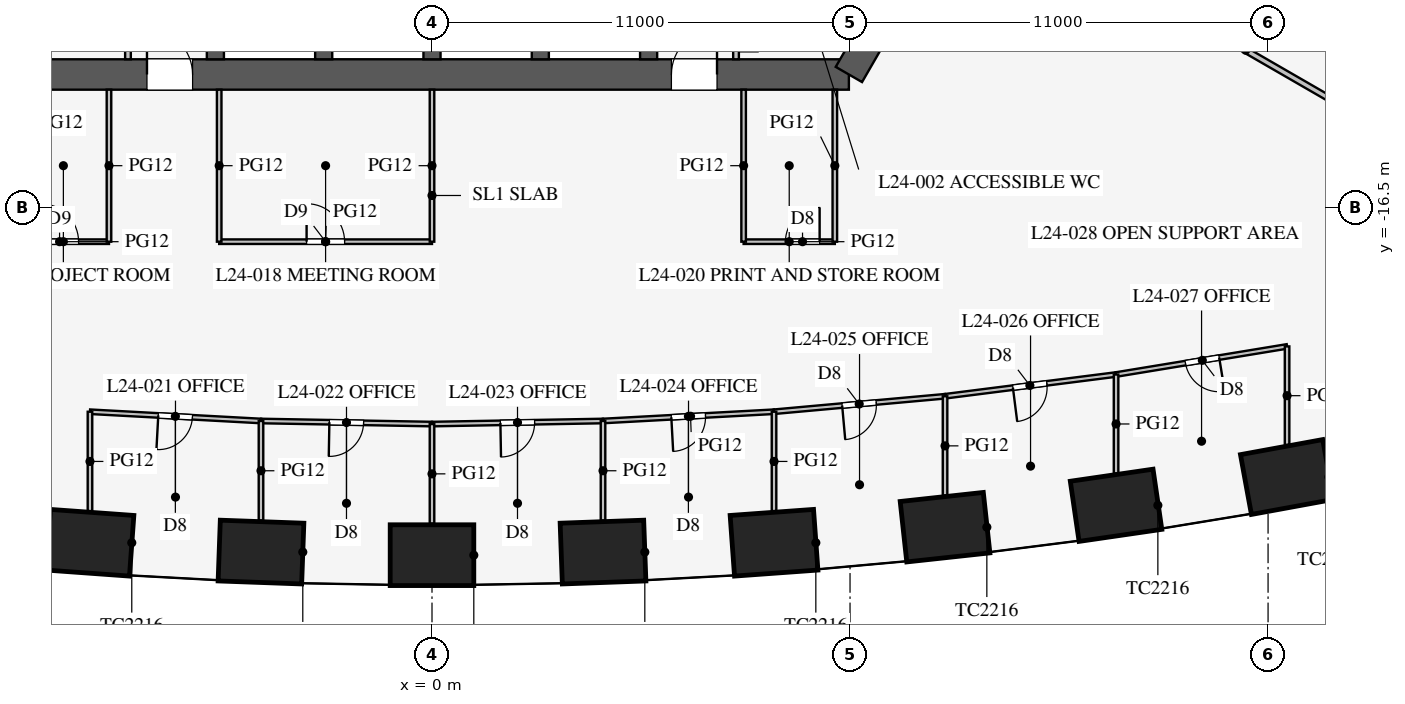
"""IFC4 building model, lengths in metres.
Left out: names, types, materials, properties, quantities, classifications, styles, units other than length and angle.
Written with IfcOpenShell. Run it as: python <this file> out.ifc"""

import sys

from ifc_helpers import new_model, si_unit, direction, frame, frame_2d, origin, origin_2d, place, context, subcontext, project, spatial, rectangle, extrude, element, fill, save


model = new_model("IFC4")
c1 = context("Model", 3, precision=1e-05, world=origin(), true_north=direction((0.0, 1.0)))
c2 = subcontext(c1, "Body", "Model", "MODEL_VIEW")
j1 = project(units=[si_unit("LENGTHUNIT", "METRE"), si_unit("PLANEANGLEUNIT", "RADIAN")], contexts=[c1])
p1 = place(None, origin())
s1 = spatial("IfcSite", under=j1, at=p1, CompositionType="ELEMENT")
p2 = place(p1, origin())
s2 = spatial("IfcBuilding", under=s1, at=p2, CompositionType="ELEMENT")
p3 = place(p2, frame((0.0, 0.0, 107.3)))
s3 = spatial("IfcBuildingStorey", under=s2, at=p3, CompositionType="ELEMENT", Elevation=107.3)
for number, where, z_axis, x_axis in (
    (1, (-9.0, -25.323, 0.0), (0.0, 0.0, 1.0), (0.997, -0.072, 0.0)),
    (2, (-4.5, -25.568, 0.0), (0.0, 0.0, 1.0), (0.999, -0.036, 0.0)),
    (3, (0.0, -25.65, 0.0), (0.0, 0.0, 1.0), (1.0, 0.0, 0.0)),
    (4, (4.5, -25.568, 0.0), (0.0, 0.0, 1.0), (0.999, 0.036, 0.0)),
    (5, (9.0, -25.323, 0.0), (0.0, 0.0, 1.0), (0.997, 0.072, 0.0)),
    (6, (13.5, -24.913, 0.0), (0.0, 0.0, 1.0), (0.994, 0.108, 0.0)),
    (7, (18.0, -24.337, 0.0), (0.0, 0.0, 1.0), (0.99, 0.144, 0.0)),
    (8, (22.5, -23.593, 0.0), (0.0, 0.0, 1.0), (0.984, 0.18, 0.0)),
):
    element("IfcColumn", number, at=place(p3, frame(where, z_axis=z_axis, x_axis=x_axis)), inside=s3, PredefinedType="COLUMN", context=c2, shape_type="SweptSolid", body=[
        extrude(rectangle(XDim=2.2, YDim=1.6, at=origin_2d()), origin(), (0.0, 0.0, 1.0), 4.2),
    ])
p4 = place(p3, frame((-10.97, -13.0, 0.0), z_axis=(0.0, 0.0, 1.0), x_axis=(1.0, 0.0, 0.0)))
e9 = element("IfcWall", 9, at=p4, inside=s3, PredefinedType="SHEAR", context=c2, shape_type="SweptSolid", body=[
    extrude(rectangle(XDim=21.939, YDim=0.8, at=frame_2d((10.97, 0.0))), origin(), (0.0, 0.0, 1.0), 4.2),
])
p5 = place(p4, frame((17.27, 0.0, 0.0)))
e10 = element("IfcOpeningElement", 10, at=p5, cuts=e9, PredefinedType="OPENING", context=c2, shape_type="SweptSolid", body=[
    extrude(rectangle(XDim=1.2, YDim=2.1, at=frame_2d((0.6, 1.05))), frame((0.0, 0.41, 0.0), z_axis=(0.0, -1.0, 0.0), x_axis=(1.0, 0.0, 0.0)), (0.0, 0.0, 1.0), 0.82),
])
p6 = place(p4, frame((3.47, 0.0, 0.0)))
e11 = element("IfcOpeningElement", 11, at=p6, cuts=e9, PredefinedType="OPENING", context=c2, shape_type="SweptSolid", body=[
    extrude(rectangle(XDim=1.2, YDim=2.1, at=frame_2d((0.6, 1.05))), frame((0.0, 0.41, 0.0), z_axis=(0.0, -1.0, 0.0), x_axis=(1.0, 0.0, 0.0)), (0.0, 0.0, 1.0), 0.82),
])
p7 = place(p3, frame((10.97, -13.0, 0.0), z_axis=(0.0, 0.0, 1.0), x_axis=(0.499995765644, 0.866027848477, 0.0)))
e12 = element("IfcWall", 12, at=p7, inside=s3, PredefinedType="SHEAR", context=c2, shape_type="SweptSolid", body=[
    extrude(rectangle(XDim=11.547, YDim=0.8, at=frame_2d((5.773, 0.0))), origin(), (0.0, 0.0, 1.0), 4.2),
])
for number, where, z_axis, x_axis in (
    (13, (-5.7, -10.025, 0.0), (0.0, 0.0, 1.0), (0.0, -1.0, 0.0)),
    (14, (-2.85, -10.025, 0.0), (0.0, 0.0, 1.0), (0.0, -1.0, 0.0)),
    (15, (0.0, -10.025, 0.0), (0.0, 0.0, 1.0), (0.0, -1.0, 0.0)),
    (16, (2.85, -10.025, 0.0), (0.0, 0.0, 1.0), (0.0, -1.0, 0.0)),
    (17, (5.7, -10.025, 0.0), (0.0, 0.0, 1.0), (0.0, -1.0, 0.0)),
):
    element("IfcWall", number, at=place(p3, frame(where, z_axis=z_axis, x_axis=x_axis)), inside=s3, PredefinedType="SHEAR", context=c2, shape_type="SweptSolid", body=[
        extrude(rectangle(XDim=2.575, YDim=0.45, at=frame_2d((1.288, 0.0))), origin(), (0.0, 0.0, 1.0), 4.2),
    ])
p8 = place(p3, frame((8.0, -7.5, 0.0), z_axis=(0.0, 0.0, 1.0), x_axis=(0.0, -1.0, 0.0)))
e18 = element("IfcWall", 18, at=p8, inside=s3, PredefinedType="PARTITIONING", context=c2, shape_type="SweptSolid", body=[
    extrude(rectangle(XDim=5.1, YDim=0.15, at=frame_2d((2.55, 0.0))), origin(), (0.0, 0.0, 1.0), 4.0),
])
p9 = place(p8, frame((2.6, 0.0, 0.0)))
e19 = element("IfcOpeningElement", 19, at=p9, cuts=e18, PredefinedType="OPENING", context=c2, shape_type="SweptSolid", body=[
    extrude(rectangle(XDim=0.9, YDim=2.1, at=frame_2d((0.45, 1.05))), frame((0.0, 0.085, 0.0), z_axis=(0.0, -1.0, 0.0), x_axis=(1.0, 0.0, 0.0)), (0.0, 0.0, 1.0), 0.17),
])
p10 = place(p3, frame((-8.0, -7.5, 0.0), z_axis=(0.0, 0.0, 1.0), x_axis=(0.0, -1.0, 0.0)))
e20 = element("IfcWall", 20, at=p10, inside=s3, PredefinedType="PARTITIONING", context=c2, shape_type="SweptSolid", body=[
    extrude(rectangle(XDim=5.1, YDim=0.15, at=frame_2d((2.55, 0.0))), origin(), (0.0, 0.0, 1.0), 4.0),
])
p11 = place(p10, frame((2.6, 0.0, 0.0)))
e21 = element("IfcOpeningElement", 21, at=p11, cuts=e20, PredefinedType="OPENING", context=c2, shape_type="SweptSolid", body=[
    extrude(rectangle(XDim=0.9, YDim=2.1, at=frame_2d((0.45, 1.05))), frame((0.0, 0.085, 0.0), z_axis=(0.0, -1.0, 0.0), x_axis=(1.0, 0.0, 0.0)), (0.0, 0.0, 1.0), 0.17),
])
p12 = place(p3, frame((14.203, -8.2, 0.0), z_axis=(0.0, 0.0, 1.0), x_axis=(0.866024668836, -0.500001272966, 0.0)))
e22 = element("IfcWall", 22, at=p12, inside=s3, PredefinedType="PARTITIONING", context=c2, shape_type="SweptSolid", body=[
    extrude(rectangle(XDim=16.65, YDim=0.15, at=frame_2d((8.325, 0.0))), origin(), (0.0, 0.0, 1.0), 2.3),
])
p13 = place(p3, frame((8.2, -17.4, 0.0), z_axis=(0.0, 0.0, 1.0), x_axis=(1.0, 0.0, 0.0)))
e23 = element("IfcWall", 23, at=p13, inside=s3, PredefinedType="PARTITIONING", context=c2, shape_type="SweptSolid", body=[
    extrude(rectangle(XDim=2.4, YDim=0.12, at=frame_2d((1.2, 0.0))), origin(), (0.0, 0.0, 1.0), 2.9),
])
p14 = place(p13, frame((1.1, 0.0, 0.15)))
e24 = element("IfcOpeningElement", 24, at=p14, cuts=e23, PredefinedType="OPENING", context=c2, shape_type="SweptSolid", body=[
    extrude(rectangle(XDim=0.9, YDim=2.1, at=frame_2d((0.45, 1.05))), frame((0.0, 0.07, 0.0), z_axis=(0.0, -1.0, 0.0), x_axis=(1.0, 0.0, 0.0)), (0.0, 0.0, 1.0), 0.14),
])
p15 = place(p3, frame((-10.9, -17.4, 0.0), z_axis=(0.0, 0.0, 1.0), x_axis=(1.0, 0.0, 0.0)))
e25 = element("IfcWall", 25, at=p15, inside=s3, PredefinedType="PARTITIONING", context=c2, shape_type="SweptSolid", body=[
    extrude(rectangle(XDim=2.4, YDim=0.12, at=frame_2d((1.2, 0.0))), origin(), (0.0, 0.0, 1.0), 2.9),
])
p16 = place(p15, frame((0.6, 0.0, 0.15)))
e26 = element("IfcOpeningElement", 26, at=p16, cuts=e25, PredefinedType="OPENING", context=c2, shape_type="SweptSolid", body=[
    extrude(rectangle(XDim=1.0, YDim=2.1, at=frame_2d((0.5, 1.05))), frame((0.0, 0.07, 0.0), z_axis=(0.0, -1.0, 0.0), x_axis=(1.0, 0.0, 0.0)), (0.0, 0.0, 1.0), 0.14),
])
p17 = place(p3, frame((-5.6, -17.4, 0.0), z_axis=(0.0, 0.0, 1.0), x_axis=(1.0, 0.0, 0.0)))
e27 = element("IfcWall", 27, at=p17, inside=s3, PredefinedType="PARTITIONING", context=c2, shape_type="SweptSolid", body=[
    extrude(rectangle(XDim=5.6, YDim=0.12, at=frame_2d((2.8, 0.0))), origin(), (0.0, 0.0, 1.0), 2.9),
])
p18 = place(p17, frame((2.3, 0.0, 0.15)))
e28 = element("IfcOpeningElement", 28, at=p18, cuts=e27, PredefinedType="OPENING", context=c2, shape_type="SweptSolid", body=[
    extrude(rectangle(XDim=1.0, YDim=2.1, at=frame_2d((0.5, 1.05))), frame((0.0, 0.07, 0.0), z_axis=(0.0, -1.0, 0.0), x_axis=(1.0, 0.0, 0.0)), (0.0, 0.0, 1.0), 0.14),
])
for number, where, z_axis, x_axis in (
    (29, (10.6, -13.4, 0.0), (0.0, 0.0, 1.0), (0.0, -1.0, 0.0)),
    (30, (8.2, -13.4, 0.0), (0.0, 0.0, 1.0), (0.0, -1.0, 0.0)),
):
    element("IfcWall", number, at=place(p3, frame(where, z_axis=z_axis, x_axis=x_axis)), inside=s3, PredefinedType="PARTITIONING", context=c2, shape_type="SweptSolid", body=[
        extrude(rectangle(XDim=4.0, YDim=0.12, at=frame_2d((2.0, 0.0))), origin(), (0.0, 0.0, 1.0), 2.9),
    ])
p19 = place(p3, frame((0.0, -13.4, 0.0), z_axis=(0.0, 0.0, 1.0), x_axis=(0.0, -1.0, 0.0)))
e31 = element("IfcWall", 31, at=p19, inside=s3, PredefinedType="PARTITIONING", context=c2, shape_type="SweptSolid", body=[
    extrude(rectangle(XDim=4.0, YDim=0.12, at=frame_2d((2.0, 0.0))), origin(), (0.0, 0.0, 1.0), 2.8),
])
for number, where, z_axis, x_axis in (
    (32, (-5.6, -13.4, 0.0), (0.0, 0.0, 1.0), (0.0, -1.0, 0.0)),
    (33, (-8.5, -13.4, 0.0), (0.0, 0.0, 1.0), (0.0, -1.0, 0.0)),
):
    element("IfcWall", number, at=place(p3, frame(where, z_axis=z_axis, x_axis=x_axis)), inside=s3, PredefinedType="PARTITIONING", context=c2, shape_type="SweptSolid", body=[
        extrude(rectangle(XDim=4.0, YDim=0.12, at=frame_2d((2.0, 0.0))), origin(), (0.0, 0.0, 1.0), 2.9),
    ])
p20 = place(p3, frame((0.0, -22.2, 0.0), z_axis=(0.0, 0.0, 1.0), x_axis=(0.999837820638, 0.018009231578, 0.0)))
e34 = element("IfcWall", 34, at=p20, inside=s3, PredefinedType="PARTITIONING", context=c2, shape_type="SweptSolid", body=[
    extrude(rectangle(XDim=4.501, YDim=0.12, at=frame_2d((2.25, 0.0))), origin(), (0.0, 0.0, 1.0), 2.9),
])
p21 = place(p20, frame((1.8, 0.0, 0.15)))
e35 = element("IfcOpeningElement", 35, at=p21, cuts=e34, PredefinedType="OPENING", context=c2, shape_type="SweptSolid", body=[
    extrude(rectangle(XDim=0.9, YDim=2.1, at=frame_2d((0.45, 1.05))), frame((0.0, 0.07, 0.0), z_axis=(0.0, -1.0, 0.0), x_axis=(1.0, 0.0, 0.0)), (0.0, 0.0, 1.0), 0.14),
])
p22 = place(p3, frame((13.5, -21.468, 0.0), z_axis=(0.0, 0.0, 1.0), x_axis=(0.992010652594, 0.12615413247, 0.0)))
e36 = element("IfcWall", 36, at=p22, inside=s3, PredefinedType="PARTITIONING", context=c2, shape_type="SweptSolid", body=[
    extrude(rectangle(XDim=4.536, YDim=0.12, at=frame_2d((2.268, 0.0))), origin(), (0.0, 0.0, 1.0), 2.9),
])
p23 = place(p22, frame((1.8, 0.0, 0.15)))
e37 = element("IfcOpeningElement", 37, at=p23, cuts=e36, PredefinedType="OPENING", context=c2, shape_type="SweptSolid", body=[
    extrude(rectangle(XDim=0.9, YDim=2.1, at=frame_2d((0.45, 1.05))), frame((0.0, 0.07, 0.0), z_axis=(0.0, -1.0, 0.0), x_axis=(1.0, 0.0, 0.0)), (0.0, 0.0, 1.0), 0.14),
])
p24 = place(p3, frame((18.0, -20.896, 0.0), z_axis=(0.0, 0.0, 1.0), x_axis=(0.986764681833, 0.162158757664, 0.0)))
e38 = element("IfcWall", 38, at=p24, inside=s3, PredefinedType="PARTITIONING", context=c2, shape_type="SweptSolid", body=[
    extrude(rectangle(XDim=4.56, YDim=0.12, at=frame_2d((2.28, 0.0))), origin(), (0.0, 0.0, 1.0), 2.9),
])
p25 = place(p24, frame((1.85, 0.0, 0.15)))
e39 = element("IfcOpeningElement", 39, at=p25, cuts=e38, PredefinedType="OPENING", context=c2, shape_type="SweptSolid", body=[
    extrude(rectangle(XDim=0.9, YDim=2.1, at=frame_2d((0.45, 1.05))), frame((0.0, 0.07, 0.0), z_axis=(0.0, -1.0, 0.0), x_axis=(1.0, 0.0, 0.0)), (0.0, 0.0, 1.0), 0.14),
])
p26 = place(p3, frame((4.5, -22.119, 0.0), z_axis=(0.0, 0.0, 1.0), x_axis=(0.998537376538, 0.054065771581, 0.0)))
e40 = element("IfcWall", 40, at=p26, inside=s3, PredefinedType="PARTITIONING", context=c2, shape_type="SweptSolid", body=[
    extrude(rectangle(XDim=4.507, YDim=0.12, at=frame_2d((2.253, 0.0))), origin(), (0.0, 0.0, 1.0), 2.9),
])
p27 = place(p26, frame((1.8, 0.0, 0.15)))
e41 = element("IfcOpeningElement", 41, at=p27, cuts=e40, PredefinedType="OPENING", context=c2, shape_type="SweptSolid", body=[
    extrude(rectangle(XDim=0.9, YDim=2.1, at=frame_2d((0.45, 1.05))), frame((0.0, 0.07, 0.0), z_axis=(0.0, -1.0, 0.0), x_axis=(1.0, 0.0, 0.0)), (0.0, 0.0, 1.0), 0.14),
])
p28 = place(p3, frame((9.0, -21.875, 0.0), z_axis=(0.0, 0.0, 1.0), x_axis=(0.995930325215, 0.090126507295, 0.0)))
e42 = element("IfcWall", 42, at=p28, inside=s3, PredefinedType="PARTITIONING", context=c2, shape_type="SweptSolid", body=[
    extrude(rectangle(XDim=4.518, YDim=0.12, at=frame_2d((2.259, 0.0))), origin(), (0.0, 0.0, 1.0), 2.9),
])
p29 = place(p28, frame((1.8, 0.0, 0.15)))
e43 = element("IfcOpeningElement", 43, at=p29, cuts=e42, PredefinedType="OPENING", context=c2, shape_type="SweptSolid", body=[
    extrude(rectangle(XDim=0.9, YDim=2.1, at=frame_2d((0.45, 1.05))), frame((0.0, 0.07, 0.0), z_axis=(0.0, -1.0, 0.0), x_axis=(1.0, 0.0, 0.0)), (0.0, 0.0, 1.0), 0.14),
])
p30 = place(p3, frame((-4.5, -22.119, 0.0), z_axis=(0.0, 0.0, 1.0), x_axis=(0.999837820638, -0.018009231578, 0.0)))
e44 = element("IfcWall", 44, at=p30, inside=s3, PredefinedType="PARTITIONING", context=c2, shape_type="SweptSolid", body=[
    extrude(rectangle(XDim=4.501, YDim=0.12, at=frame_2d((2.25, 0.0))), origin(), (0.0, 0.0, 1.0), 2.9),
])
p31 = place(p30, frame((1.8, 0.0, 0.15)))
e45 = element("IfcOpeningElement", 45, at=p31, cuts=e44, PredefinedType="OPENING", context=c2, shape_type="SweptSolid", body=[
    extrude(rectangle(XDim=0.9, YDim=2.1, at=frame_2d((0.45, 1.05))), frame((0.0, 0.07, 0.0), z_axis=(0.0, -1.0, 0.0), x_axis=(1.0, 0.0, 0.0)), (0.0, 0.0, 1.0), 0.14),
])
p32 = place(p3, frame((-9.0, -21.875, 0.0), z_axis=(0.0, 0.0, 1.0), x_axis=(0.998537376538, -0.054065771581, 0.0)))
e46 = element("IfcWall", 46, at=p32, inside=s3, PredefinedType="PARTITIONING", context=c2, shape_type="SweptSolid", body=[
    extrude(rectangle(XDim=4.507, YDim=0.12, at=frame_2d((2.253, 0.0))), origin(), (0.0, 0.0, 1.0), 2.9),
])
p33 = place(p32, frame((1.8, 0.0, 0.15)))
e47 = element("IfcOpeningElement", 47, at=p33, cuts=e46, PredefinedType="OPENING", context=c2, shape_type="SweptSolid", body=[
    extrude(rectangle(XDim=0.9, YDim=2.1, at=frame_2d((0.45, 1.05))), frame((0.0, 0.07, 0.0), z_axis=(0.0, -1.0, 0.0), x_axis=(1.0, 0.0, 0.0)), (0.0, 0.0, 1.0), 0.14),
])
p34 = place(p3, frame((0.0, -22.2, 0.0), z_axis=(0.0, 0.0, 1.0), x_axis=(0.0, -1.0, 0.0)))
e48 = element("IfcWall", 48, at=p34, inside=s3, PredefinedType="PARTITIONING", context=c2, shape_type="SweptSolid", body=[
    extrude(rectangle(XDim=2.62, YDim=0.12, at=frame_2d((1.31, 0.0))), origin(), (0.0, 0.0, 1.0), 2.8),
])
p35 = place(p3, frame((13.5, -21.468, 0.0), z_axis=(0.0, 0.0, 1.0), x_axis=(0.0, -1.0, 0.0)))
e49 = element("IfcWall", 49, at=p35, inside=s3, PredefinedType="PARTITIONING", context=c2, shape_type="SweptSolid", body=[
    extrude(rectangle(XDim=2.61, YDim=0.12, at=frame_2d((1.305, 0.0))), origin(), (0.0, 0.0, 1.0), 2.6),
])
p36 = place(p3, frame((18.0, -20.896, 0.0), z_axis=(0.0, 0.0, 1.0), x_axis=(0.0, -1.0, 0.0)))
e50 = element("IfcWall", 50, at=p36, inside=s3, PredefinedType="PARTITIONING", context=c2, shape_type="SweptSolid", body=[
    extrude(rectangle(XDim=2.603, YDim=0.12, at=frame_2d((1.302, 0.0))), origin(), (0.0, 0.0, 1.0), 2.8),
])
p37 = place(p3, frame((22.5, -20.156, 0.0), z_axis=(0.0, 0.0, 1.0), x_axis=(0.0, -1.0, 0.0)))
e51 = element("IfcWall", 51, at=p37, inside=s3, PredefinedType="PARTITIONING", context=c2, shape_type="SweptSolid", body=[
    extrude(rectangle(XDim=2.593, YDim=0.12, at=frame_2d((1.296, 0.0))), origin(), (0.0, 0.0, 1.0), 2.9),
])
p38 = place(p3, frame((4.5, -22.119, 0.0), z_axis=(0.0, 0.0, 1.0), x_axis=(0.0, -1.0, 0.0)))
e52 = element("IfcWall", 52, at=p38, inside=s3, PredefinedType="PARTITIONING", context=c2, shape_type="SweptSolid", body=[
    extrude(rectangle(XDim=2.619, YDim=0.12, at=frame_2d((1.31, 0.0))), origin(), (0.0, 0.0, 1.0), 2.8),
])
p39 = place(p3, frame((9.0, -21.875, 0.0), z_axis=(0.0, 0.0, 1.0), x_axis=(0.0, -1.0, 0.0)))
e53 = element("IfcWall", 53, at=p39, inside=s3, PredefinedType="PARTITIONING", context=c2, shape_type="SweptSolid", body=[
    extrude(rectangle(XDim=2.616, YDim=0.12, at=frame_2d((1.308, 0.0))), origin(), (0.0, 0.0, 1.0), 2.9),
])
p40 = place(p3, frame((-4.5, -22.119, 0.0), z_axis=(0.0, 0.0, 1.0), x_axis=(0.0, -1.0, 0.0)))
e54 = element("IfcWall", 54, at=p40, inside=s3, PredefinedType="PARTITIONING", context=c2, shape_type="SweptSolid", body=[
    extrude(rectangle(XDim=2.619, YDim=0.12, at=frame_2d((1.31, 0.0))), origin(), (0.0, 0.0, 1.0), 2.8),
])
p41 = place(p3, frame((-9.0, -21.875, 0.0), z_axis=(0.0, 0.0, 1.0), x_axis=(0.0, -1.0, 0.0)))
e55 = element("IfcWall", 55, at=p41, inside=s3, PredefinedType="PARTITIONING", context=c2, shape_type="SweptSolid", body=[
    extrude(rectangle(XDim=2.616, YDim=0.12, at=frame_2d((1.308, 0.0))), origin(), (0.0, 0.0, 1.0), 2.9),
])
p42 = place(p5, origin())
e56 = element("IfcDoor", 56, at=p42, inside=s3, OperationType="SINGLE_SWING_RIGHT", PredefinedType="DOOR", context=c2, shape_type="SweptSolid", body=[
    extrude(rectangle(XDim=1.2, YDim=2.1, at=frame_2d((0.6, 1.05))), frame((0.0, 0.025, 0.0), z_axis=(0.0, -1.0, 0.0), x_axis=(1.0, 0.0, 0.0)), (0.0, 0.0, 1.0), 0.05),
])
fill(e10, e56)
p43 = place(p6, origin())
e57 = element("IfcDoor", 57, at=p43, inside=s3, OperationType="SINGLE_SWING_LEFT", PredefinedType="DOOR", context=c2, shape_type="SweptSolid", body=[
    extrude(rectangle(XDim=1.2, YDim=2.1, at=frame_2d((0.6, 1.05))), frame((0.0, 0.025, 0.0), z_axis=(0.0, -1.0, 0.0), x_axis=(1.0, 0.0, 0.0)), (0.0, 0.0, 1.0), 0.05),
])
fill(e11, e57)
p44 = place(p18, origin())
e58 = element("IfcDoor", 58, at=p44, inside=s3, OperationType="SINGLE_SWING_LEFT", PredefinedType="DOOR", context=c2, shape_type="SweptSolid", body=[
    extrude(rectangle(XDim=1.0, YDim=2.1, at=frame_2d((0.5, 1.05))), frame((0.0, 0.025, 0.0), z_axis=(0.0, -1.0, 0.0), x_axis=(1.0, 0.0, 0.0)), (0.0, 0.0, 1.0), 0.05),
])
fill(e28, e58)
p45 = place(p16, origin())
e59 = element("IfcDoor", 59, at=p45, inside=s3, OperationType="SINGLE_SWING_LEFT", PredefinedType="DOOR", context=c2, shape_type="SweptSolid", body=[
    extrude(rectangle(XDim=1.0, YDim=2.1, at=frame_2d((0.5, 1.05))), frame((0.0, 0.025, 0.0), z_axis=(0.0, -1.0, 0.0), x_axis=(1.0, 0.0, 0.0)), (0.0, 0.0, 1.0), 0.05),
])
fill(e26, e59)
p46 = place(p14, origin())
e60 = element("IfcDoor", 60, at=p46, inside=s3, OperationType="SINGLE_SWING_RIGHT", PredefinedType="DOOR", context=c2, shape_type="SweptSolid", body=[
    extrude(rectangle(XDim=0.9, YDim=2.1, at=frame_2d((0.45, 1.05))), frame((0.0, 0.025, 0.0), z_axis=(0.0, -1.0, 0.0), x_axis=(1.0, 0.0, 0.0)), (0.0, 0.0, 1.0), 0.05),
])
fill(e24, e60)
p47 = place(p33, frame((0.9, 0.0, 0.0), z_axis=(0.0, 0.0, 1.0), x_axis=(-1.0, 0.0, 0.0)))
e61 = element("IfcDoor", 61, at=p47, inside=s3, OperationType="SINGLE_SWING_RIGHT", PredefinedType="DOOR", context=c2, shape_type="SweptSolid", body=[
    extrude(rectangle(XDim=0.9, YDim=2.1, at=frame_2d((0.45, 1.05))), frame((0.0, 0.025, 0.0), z_axis=(0.0, -1.0, 0.0), x_axis=(1.0, 0.0, 0.0)), (0.0, 0.0, 1.0), 0.05),
])
fill(e47, e61)
p48 = place(p31, frame((0.9, 0.0, 0.0), z_axis=(0.0, 0.0, 1.0), x_axis=(-1.0, 0.0, 0.0)))
e62 = element("IfcDoor", 62, at=p48, inside=s3, OperationType="SINGLE_SWING_RIGHT", PredefinedType="DOOR", context=c2, shape_type="SweptSolid", body=[
    extrude(rectangle(XDim=0.9, YDim=2.1, at=frame_2d((0.45, 1.05))), frame((0.0, 0.025, 0.0), z_axis=(0.0, -1.0, 0.0), x_axis=(1.0, 0.0, 0.0)), (0.0, 0.0, 1.0), 0.05),
])
fill(e45, e62)
p49 = place(p21, frame((0.9, 0.0, 0.0), z_axis=(0.0, 0.0, 1.0), x_axis=(-1.0, 0.0, 0.0)))
e63 = element("IfcDoor", 63, at=p49, inside=s3, OperationType="SINGLE_SWING_RIGHT", PredefinedType="DOOR", context=c2, shape_type="SweptSolid", body=[
    extrude(rectangle(XDim=0.9, YDim=2.1, at=frame_2d((0.45, 1.05))), frame((0.0, 0.025, 0.0), z_axis=(0.0, -1.0, 0.0), x_axis=(1.0, 0.0, 0.0)), (0.0, 0.0, 1.0), 0.05),
])
fill(e35, e63)
p50 = place(p27, frame((0.9, 0.0, 0.0), z_axis=(0.0, 0.0, 1.0), x_axis=(-1.0, 0.0, 0.0)))
e64 = element("IfcDoor", 64, at=p50, inside=s3, OperationType="SINGLE_SWING_RIGHT", PredefinedType="DOOR", context=c2, shape_type="SweptSolid", body=[
    extrude(rectangle(XDim=0.9, YDim=2.1, at=frame_2d((0.45, 1.05))), frame((0.0, 0.025, 0.0), z_axis=(0.0, -1.0, 0.0), x_axis=(1.0, 0.0, 0.0)), (0.0, 0.0, 1.0), 0.05),
])
fill(e41, e64)
p51 = place(p29, frame((0.9, 0.0, 0.0), z_axis=(0.0, 0.0, 1.0), x_axis=(-1.0, 0.0, 0.0)))
e65 = element("IfcDoor", 65, at=p51, inside=s3, OperationType="SINGLE_SWING_RIGHT", PredefinedType="DOOR", context=c2, shape_type="SweptSolid", body=[
    extrude(rectangle(XDim=0.9, YDim=2.1, at=frame_2d((0.45, 1.05))), frame((0.0, 0.025, 0.0), z_axis=(0.0, -1.0, 0.0), x_axis=(1.0, 0.0, 0.0)), (0.0, 0.0, 1.0), 0.05),
])
fill(e43, e65)
p52 = place(p23, frame((0.9, 0.0, 0.0), z_axis=(0.0, 0.0, 1.0), x_axis=(-1.0, 0.0, 0.0)))
e66 = element("IfcDoor", 66, at=p52, inside=s3, OperationType="SINGLE_SWING_RIGHT", PredefinedType="DOOR", context=c2, shape_type="SweptSolid", body=[
    extrude(rectangle(XDim=0.9, YDim=2.1, at=frame_2d((0.45, 1.05))), frame((0.0, 0.025, 0.0), z_axis=(0.0, -1.0, 0.0), x_axis=(1.0, 0.0, 0.0)), (0.0, 0.0, 1.0), 0.05),
])
fill(e37, e66)
p53 = place(p25, frame((0.9, 0.0, 0.0), z_axis=(0.0, 0.0, 1.0), x_axis=(-1.0, 0.0, 0.0)))
e67 = element("IfcDoor", 67, at=p53, inside=s3, OperationType="SINGLE_SWING_LEFT", PredefinedType="DOOR", context=c2, shape_type="SweptSolid", body=[
    extrude(rectangle(XDim=0.9, YDim=2.1, at=frame_2d((0.45, 1.05))), frame((0.0, 0.025, 0.0), z_axis=(0.0, -1.0, 0.0), x_axis=(1.0, 0.0, 0.0)), (0.0, 0.0, 1.0), 0.05),
])
fill(e39, e67)
save(model, sys.argv[1])
